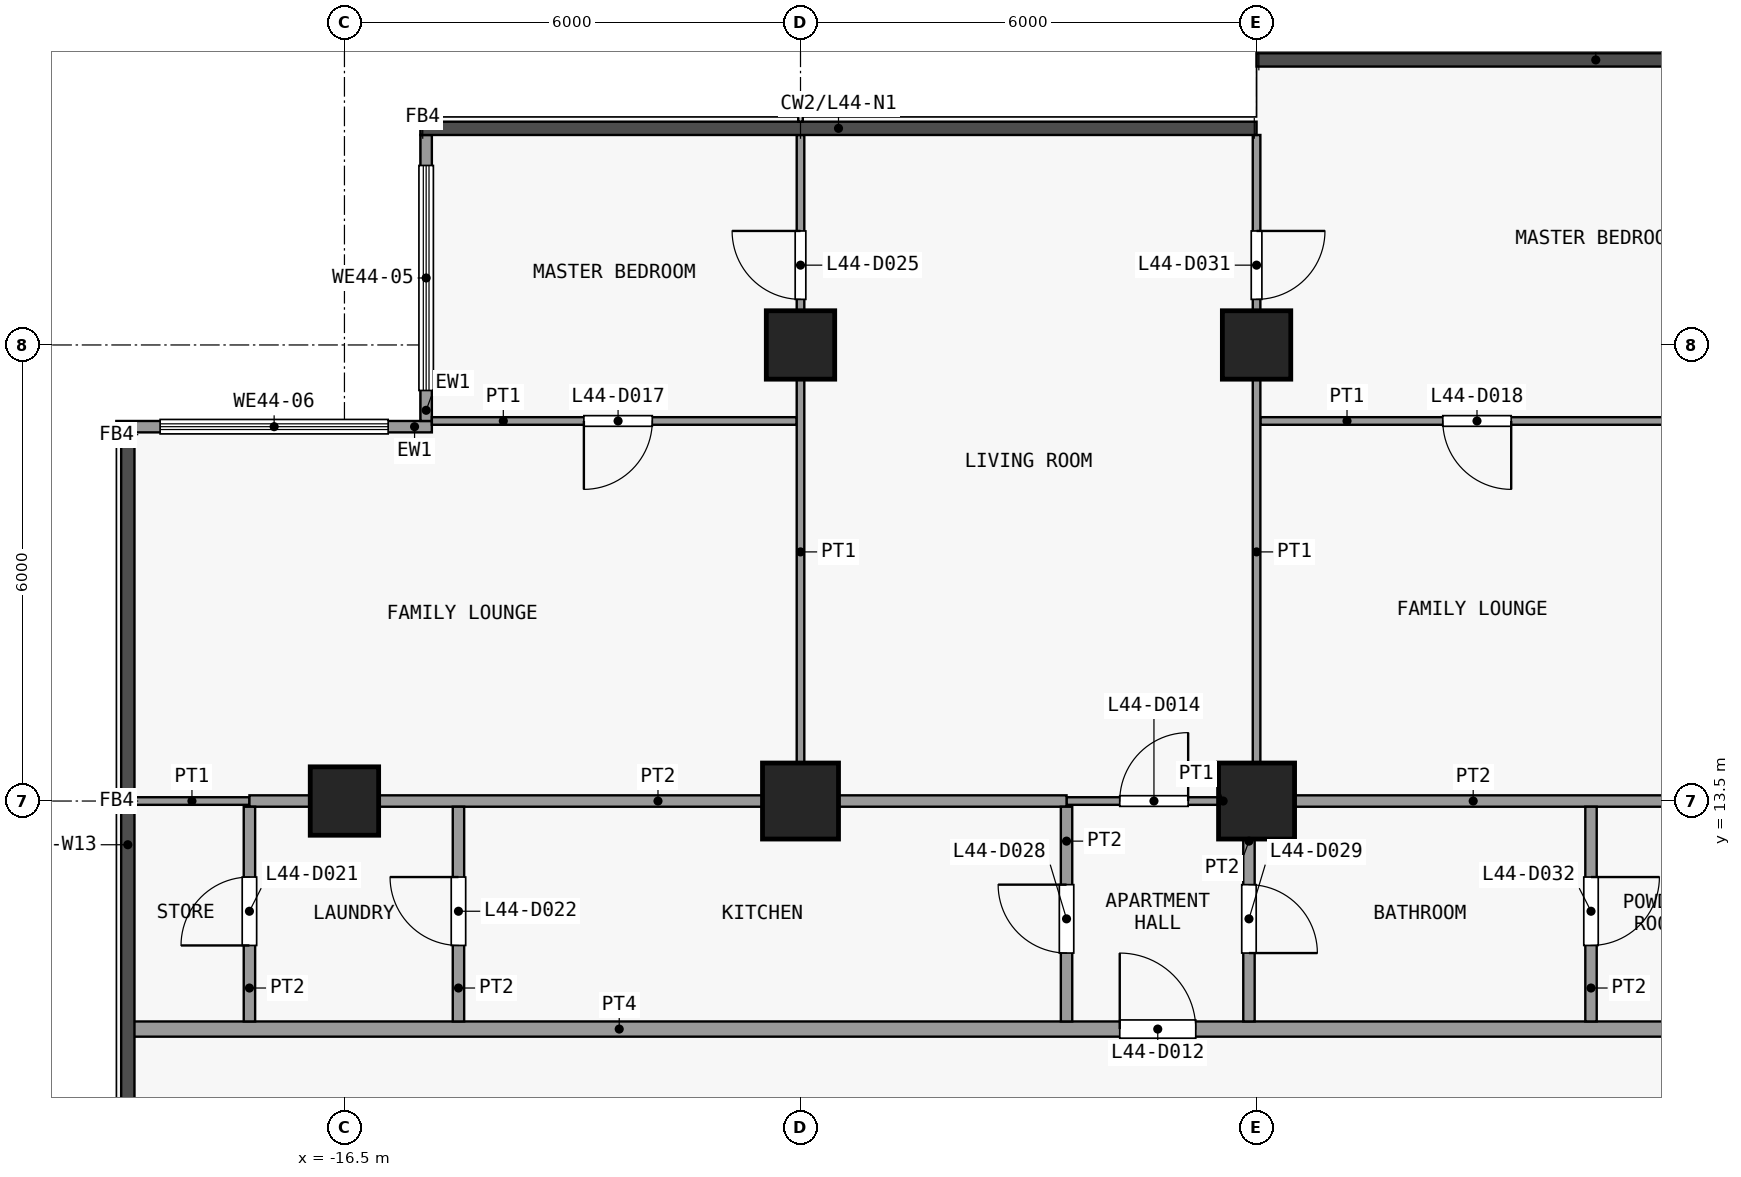
"""IFC4 building model, lengths in metres.
Left out: names, types, materials, properties, quantities, classifications, styles, units other than length and angle.
Written with IfcOpenShell. Run it as: python <this file> out.ifc"""

import sys

from ifc_helpers import new_model, si_unit, direction, frame, frame_2d, origin, origin_2d, place, context, subcontext, project, spatial, rectangle, extrude, element, fill, save


model = new_model("IFC4")
c1 = context("Model", 3, precision=1e-05, world=origin(), true_north=direction((0.0, 1.0)))
c2 = subcontext(c1, "Body", "Model", "MODEL_VIEW")
j1 = project(units=[si_unit("LENGTHUNIT", "METRE"), si_unit("PLANEANGLEUNIT", "RADIAN")], contexts=[c1])
p1 = place(None, origin())
s1 = spatial("IfcSite", under=j1, at=p1, CompositionType="ELEMENT")
p2 = place(p1, origin())
s2 = spatial("IfcBuilding", under=s1, at=p2, CompositionType="ELEMENT")
p3 = place(p2, frame((0.0, 0.0, 178.1)))
s3 = spatial("IfcBuildingStorey", under=s2, at=p3, CompositionType="ELEMENT", Elevation=178.1)
p4 = place(p3, frame((-16.5, 13.5, 0.0), z_axis=(0.0, 0.0, 1.0), x_axis=(1.0, 0.0, 0.0)))
e1 = element("IfcColumn", 1, at=p4, inside=s3, PredefinedType="COLUMN", context=c2, shape_type="SweptSolid", body=[
    extrude(rectangle(XDim=0.9, YDim=0.9, at=origin_2d()), origin(), (0.0, 0.0, 1.0), 3.6),
])
p5 = place(p3, frame((-10.5, 13.5, 0.0), z_axis=(0.0, 0.0, 1.0), x_axis=(1.0, 0.0, 0.0)))
e2 = element("IfcColumn", 2, at=p5, inside=s3, PredefinedType="COLUMN", context=c2, shape_type="SweptSolid", body=[
    extrude(rectangle(XDim=1.0, YDim=1.0, at=origin_2d()), origin(), (0.0, 0.0, 1.0), 3.6),
])
p6 = place(p3, frame((-10.5, 19.5, 0.0), z_axis=(0.0, 0.0, 1.0), x_axis=(1.0, 0.0, 0.0)))
e3 = element("IfcColumn", 3, at=p6, inside=s3, PredefinedType="COLUMN", context=c2, shape_type="SweptSolid", body=[
    extrude(rectangle(XDim=0.9, YDim=0.9, at=origin_2d()), origin(), (0.0, 0.0, 1.0), 3.6),
])
p7 = place(p3, frame((-4.5, 13.5, 0.0), z_axis=(0.0, 0.0, 1.0), x_axis=(1.0, 0.0, 0.0)))
e4 = element("IfcColumn", 4, at=p7, inside=s3, PredefinedType="COLUMN", context=c2, shape_type="SweptSolid", body=[
    extrude(rectangle(XDim=1.0, YDim=1.0, at=origin_2d()), origin(), (0.0, 0.0, 1.0), 3.6),
])
p8 = place(p3, frame((-4.5, 19.5, 0.0), z_axis=(0.0, 0.0, 1.0), x_axis=(1.0, 0.0, 0.0)))
e5 = element("IfcColumn", 5, at=p8, inside=s3, PredefinedType="COLUMN", context=c2, shape_type="SweptSolid", body=[
    extrude(rectangle(XDim=0.9, YDim=0.9, at=origin_2d()), origin(), (0.0, 0.0, 1.0), 3.6),
])
p9 = place(p3, frame((-15.425, 18.5, 0.0), z_axis=(0.0, 0.0, 1.0), x_axis=(0.0, 1.0, 0.0)))
e6 = element("IfcWall", 6, at=p9, inside=s3, PredefinedType="SOLIDWALL", context=c2, shape_type="SweptSolid", body=[
    extrude(rectangle(XDim=3.762, YDim=0.15, at=frame_2d((1.881, 0.0))), origin(), (0.0, 0.0, 1.0), 3.3),
])
p10 = place(p9, frame((0.401, 0.0, 0.9)))
e7 = element("IfcOpeningElement", 7, at=p10, cuts=e6, PredefinedType="OPENING", context=c2, shape_type="SweptSolid", body=[
    extrude(rectangle(XDim=2.96, YDim=2.4, at=frame_2d((1.48, 1.2))), frame((0.0, 0.085, 0.0), z_axis=(0.0, -1.0, 0.0), x_axis=(1.0, 0.0, 0.0)), (0.0, 0.0, 1.0), 0.17),
])
p11 = place(p3, frame((-19.5, 18.425, 0.0), z_axis=(0.0, 0.0, 1.0), x_axis=(1.0, 0.0, 0.0)))
e8 = element("IfcWall", 8, at=p11, inside=s3, PredefinedType="SOLIDWALL", context=c2, shape_type="SweptSolid", body=[
    extrude(rectangle(XDim=4.15, YDim=0.15, at=frame_2d((2.075, 0.0))), origin(), (0.0, 0.0, 1.0), 3.3),
])
p12 = place(p11, frame((0.575, 0.0, 0.9)))
e9 = element("IfcOpeningElement", 9, at=p12, cuts=e8, PredefinedType="OPENING", context=c2, shape_type="SweptSolid", body=[
    extrude(rectangle(XDim=3.0, YDim=2.4, at=frame_2d((1.5, 1.2))), frame((0.0, 0.085, 0.0), z_axis=(0.0, -1.0, 0.0), x_axis=(1.0, 0.0, 0.0)), (0.0, 0.0, 1.0), 0.17),
])
p13 = place(p3, frame((-19.35, 10.5, 0.0), z_axis=(0.0, 0.0, 1.0), x_axis=(1.0, 0.0, 0.0)))
e10 = element("IfcWall", 10, at=p13, inside=s3, PredefinedType="PARTITIONING", context=c2, shape_type="SweptSolid", body=[
    extrude(rectangle(XDim=37.2, YDim=0.2, at=frame_2d((18.6, 0.0))), origin(), (0.0, 0.0, 1.0), 3.3),
])
p14 = place(p13, frame((13.05, 0.0, 0.0)))
e11 = element("IfcOpeningElement", 11, at=p14, cuts=e10, PredefinedType="OPENING", context=c2, shape_type="SweptSolid", body=[
    extrude(rectangle(XDim=1.0, YDim=2.1, at=frame_2d((0.5, 1.05))), frame((0.0, 0.11, 0.0), z_axis=(0.0, -1.0, 0.0), x_axis=(1.0, 0.0, 0.0)), (0.0, 0.0, 1.0), 0.22),
])
p15 = place(p13, frame((27.05, 0.0, 0.0)))
e12 = element("IfcOpeningElement", 12, at=p15, cuts=e10, PredefinedType="OPENING", context=c2, shape_type="SweptSolid", body=[
    extrude(rectangle(XDim=1.0, YDim=2.1, at=frame_2d((0.5, 1.05))), frame((0.0, 0.11, 0.0), z_axis=(0.0, -1.0, 0.0), x_axis=(1.0, 0.0, 0.0)), (0.0, 0.0, 1.0), 0.22),
])
p16 = place(p3, frame((-19.262, 13.5, 0.0), z_axis=(0.0, 0.0, 1.0), x_axis=(1.0, 0.0, 0.0)))
e13 = element("IfcWall", 13, at=p16, inside=s3, PredefinedType="PARTITIONING", context=c2, shape_type="SweptSolid", body=[
    extrude(rectangle(XDim=1.512, YDim=0.1, at=frame_2d((0.756, 0.0))), origin(), (0.0, 0.0, 1.0), 3.3),
])
p17 = place(p3, frame((-7.0, 13.5, 0.0), z_axis=(0.0, 0.0, 1.0), x_axis=(1.0, 0.0, 0.0)))
e14 = element("IfcWall", 14, at=p17, inside=s3, PredefinedType="PARTITIONING", context=c2, shape_type="SweptSolid", body=[
    extrude(rectangle(XDim=2.4, YDim=0.1, at=frame_2d((1.2, 0.0))), origin(), (0.0, 0.0, 1.0), 3.3),
])
p18 = place(p17, frame((0.7, 0.0, 0.0)))
e15 = element("IfcOpeningElement", 15, at=p18, cuts=e14, PredefinedType="OPENING", context=c2, shape_type="SweptSolid", body=[
    extrude(rectangle(XDim=0.9, YDim=2.1, at=frame_2d((0.45, 1.05))), frame((0.0, 0.06, 0.0), z_axis=(0.0, -1.0, 0.0), x_axis=(1.0, 0.0, 0.0)), (0.0, 0.0, 1.0), 0.12),
])
p19 = place(p3, frame((-17.75, 13.5, 0.0), z_axis=(0.0, 0.0, 1.0), x_axis=(1.0, 0.0, 0.0)))
e16 = element("IfcWall", 16, at=p19, inside=s3, PredefinedType="PARTITIONING", context=c2, shape_type="SweptSolid", body=[
    extrude(rectangle(XDim=10.75, YDim=0.15, at=frame_2d((5.375, 0.0))), origin(), (0.0, 0.0, 1.0), 3.3),
])
p20 = place(p3, frame((-4.5, 13.5, 0.0), z_axis=(0.0, 0.0, 1.0), x_axis=(1.0, 0.0, 0.0)))
e17 = element("IfcWall", 17, at=p20, inside=s3, PredefinedType="PARTITIONING", context=c2, shape_type="SweptSolid", body=[
    extrude(rectangle(XDim=5.7, YDim=0.15, at=frame_2d((2.85, 0.0))), origin(), (0.0, 0.0, 1.0), 3.3),
])
p21 = place(p3, frame((-15.35, 18.5, 0.0), z_axis=(0.0, 0.0, 1.0), x_axis=(1.0, 0.0, 0.0)))
e18 = element("IfcWall", 18, at=p21, inside=s3, PredefinedType="PARTITIONING", context=c2, shape_type="SweptSolid", body=[
    extrude(rectangle(XDim=4.8, YDim=0.1, at=frame_2d((2.4, 0.0))), origin(), (0.0, 0.0, 1.0), 3.3),
])
p22 = place(p21, frame((2.0, 0.0, 0.0)))
e19 = element("IfcOpeningElement", 19, at=p22, cuts=e18, PredefinedType="OPENING", context=c2, shape_type="SweptSolid", body=[
    extrude(rectangle(XDim=0.9, YDim=2.1, at=frame_2d((0.45, 1.05))), frame((0.0, 0.06, 0.0), z_axis=(0.0, -1.0, 0.0), x_axis=(1.0, 0.0, 0.0)), (0.0, 0.0, 1.0), 0.12),
])
p23 = place(p3, frame((-4.45, 18.5, 0.0), z_axis=(0.0, 0.0, 1.0), x_axis=(1.0, 0.0, 0.0)))
e20 = element("IfcWall", 20, at=p23, inside=s3, PredefinedType="PARTITIONING", context=c2, shape_type="SweptSolid", body=[
    extrude(rectangle(XDim=5.65, YDim=0.1, at=frame_2d((2.825, 0.0))), origin(), (0.0, 0.0, 1.0), 3.3),
])
p24 = place(p23, frame((2.4, 0.0, 0.0)))
e21 = element("IfcOpeningElement", 21, at=p24, cuts=e20, PredefinedType="OPENING", context=c2, shape_type="SweptSolid", body=[
    extrude(rectangle(XDim=0.9, YDim=2.1, at=frame_2d((0.45, 1.05))), frame((0.0, 0.06, 0.0), z_axis=(0.0, -1.0, 0.0), x_axis=(1.0, 0.0, 0.0)), (0.0, 0.0, 1.0), 0.12),
])
p25 = place(p3, frame((-17.75, 10.6, 0.0), z_axis=(0.0, 0.0, 1.0), x_axis=(0.0, 1.0, 0.0)))
e22 = element("IfcWall", 22, at=p25, inside=s3, PredefinedType="PARTITIONING", context=c2, shape_type="SweptSolid", body=[
    extrude(rectangle(XDim=2.825, YDim=0.15, at=frame_2d((1.413, 0.0))), origin(), (0.0, 0.0, 1.0), 3.3),
])
p26 = place(p25, frame((1.0, 0.0, 0.0)))
e23 = element("IfcOpeningElement", 23, at=p26, cuts=e22, PredefinedType="OPENING", context=c2, shape_type="SweptSolid", body=[
    extrude(rectangle(XDim=0.9, YDim=2.1, at=frame_2d((0.45, 1.05))), frame((0.0, 0.085, 0.0), z_axis=(0.0, -1.0, 0.0), x_axis=(1.0, 0.0, 0.0)), (0.0, 0.0, 1.0), 0.17),
])
p27 = place(p3, frame((-15.0, 10.6, 0.0), z_axis=(0.0, 0.0, 1.0), x_axis=(0.0, 1.0, 0.0)))
e24 = element("IfcWall", 24, at=p27, inside=s3, PredefinedType="PARTITIONING", context=c2, shape_type="SweptSolid", body=[
    extrude(rectangle(XDim=2.825, YDim=0.15, at=frame_2d((1.413, 0.0))), origin(), (0.0, 0.0, 1.0), 3.3),
])
p28 = place(p27, frame((1.0, 0.0, 0.0)))
e25 = element("IfcOpeningElement", 25, at=p28, cuts=e24, PredefinedType="OPENING", context=c2, shape_type="SweptSolid", body=[
    extrude(rectangle(XDim=0.9, YDim=2.1, at=frame_2d((0.45, 1.05))), frame((0.0, 0.085, 0.0), z_axis=(0.0, -1.0, 0.0), x_axis=(1.0, 0.0, 0.0)), (0.0, 0.0, 1.0), 0.17),
])
p29 = place(p3, frame((-10.5, 13.575, 0.0), z_axis=(0.0, 0.0, 1.0), x_axis=(0.0, 1.0, 0.0)))
e26 = element("IfcWall", 26, at=p29, inside=s3, PredefinedType="PARTITIONING", context=c2, shape_type="SweptSolid", body=[
    extrude(rectangle(XDim=8.688, YDim=0.1, at=frame_2d((4.344, 0.0))), origin(), (0.0, 0.0, 1.0), 3.3),
])
p30 = place(p29, frame((6.525, 0.0, 0.0)))
e27 = element("IfcOpeningElement", 27, at=p30, cuts=e26, PredefinedType="OPENING", context=c2, shape_type="SweptSolid", body=[
    extrude(rectangle(XDim=0.9, YDim=2.1, at=frame_2d((0.45, 1.05))), frame((0.0, 0.06, 0.0), z_axis=(0.0, -1.0, 0.0), x_axis=(1.0, 0.0, 0.0)), (0.0, 0.0, 1.0), 0.12),
])
p31 = place(p3, frame((-7.0, 10.6, 0.0), z_axis=(0.0, 0.0, 1.0), x_axis=(0.0, 1.0, 0.0)))
e28 = element("IfcWall", 28, at=p31, inside=s3, PredefinedType="PARTITIONING", context=c2, shape_type="SweptSolid", body=[
    extrude(rectangle(XDim=2.825, YDim=0.15, at=frame_2d((1.413, 0.0))), origin(), (0.0, 0.0, 1.0), 3.3),
])
p32 = place(p31, frame((0.9, 0.0, 0.0)))
e29 = element("IfcOpeningElement", 29, at=p32, cuts=e28, PredefinedType="OPENING", context=c2, shape_type="SweptSolid", body=[
    extrude(rectangle(XDim=0.9, YDim=2.1, at=frame_2d((0.45, 1.05))), frame((0.0, 0.085, 0.0), z_axis=(0.0, -1.0, 0.0), x_axis=(1.0, 0.0, 0.0)), (0.0, 0.0, 1.0), 0.17),
])
p33 = place(p3, frame((-4.6, 10.6, 0.0), z_axis=(0.0, 0.0, 1.0), x_axis=(0.0, 1.0, 0.0)))
e30 = element("IfcWall", 30, at=p33, inside=s3, PredefinedType="PARTITIONING", context=c2, shape_type="SweptSolid", body=[
    extrude(rectangle(XDim=2.825, YDim=0.15, at=frame_2d((1.413, 0.0))), origin(), (0.0, 0.0, 1.0), 3.3),
])
p34 = place(p33, frame((0.9, 0.0, 0.0)))
e31 = element("IfcOpeningElement", 31, at=p34, cuts=e30, PredefinedType="OPENING", context=c2, shape_type="SweptSolid", body=[
    extrude(rectangle(XDim=0.9, YDim=2.1, at=frame_2d((0.45, 1.05))), frame((0.0, 0.085, 0.0), z_axis=(0.0, -1.0, 0.0), x_axis=(1.0, 0.0, 0.0)), (0.0, 0.0, 1.0), 0.17),
])
p35 = place(p3, frame((-4.5, 13.575, 0.0), z_axis=(0.0, 0.0, 1.0), x_axis=(0.0, 1.0, 0.0)))
e32 = element("IfcWall", 32, at=p35, inside=s3, PredefinedType="PARTITIONING", context=c2, shape_type="SweptSolid", body=[
    extrude(rectangle(XDim=8.688, YDim=0.1, at=frame_2d((4.344, 0.0))), origin(), (0.0, 0.0, 1.0), 3.3),
])
p36 = place(p35, frame((6.525, 0.0, 0.0)))
e33 = element("IfcOpeningElement", 33, at=p36, cuts=e32, PredefinedType="OPENING", context=c2, shape_type="SweptSolid", body=[
    extrude(rectangle(XDim=0.9, YDim=2.1, at=frame_2d((0.45, 1.05))), frame((0.0, 0.06, 0.0), z_axis=(0.0, -1.0, 0.0), x_axis=(1.0, 0.0, 0.0)), (0.0, 0.0, 1.0), 0.12),
])
p37 = place(p3, frame((-0.1, 10.6, 0.0), z_axis=(0.0, 0.0, 1.0), x_axis=(0.0, 1.0, 0.0)))
e34 = element("IfcWall", 34, at=p37, inside=s3, PredefinedType="PARTITIONING", context=c2, shape_type="SweptSolid", body=[
    extrude(rectangle(XDim=2.825, YDim=0.15, at=frame_2d((1.413, 0.0))), origin(), (0.0, 0.0, 1.0), 3.3),
])
p38 = place(p37, frame((1.0, 0.0, 0.0)))
e35 = element("IfcOpeningElement", 35, at=p38, cuts=e34, PredefinedType="OPENING", context=c2, shape_type="SweptSolid", body=[
    extrude(rectangle(XDim=0.9, YDim=2.1, at=frame_2d((0.45, 1.05))), frame((0.0, 0.085, 0.0), z_axis=(0.0, -1.0, 0.0), x_axis=(1.0, 0.0, 0.0)), (0.0, 0.0, 1.0), 0.17),
])
p39 = place(p10, origin())
e36 = element("IfcWindow", 36, at=p39, inside=s3, PartitioningType="SINGLE_PANEL", PredefinedType="WINDOW", context=c2, shape_type="SweptSolid", body=[
    extrude(rectangle(XDim=2.96, YDim=2.4, at=frame_2d((1.48, 1.2))), frame((0.0, 0.03, 0.0), z_axis=(0.0, -1.0, 0.0), x_axis=(1.0, 0.0, 0.0)), (0.0, 0.0, 1.0), 0.06),
])
fill(e7, e36)
p40 = place(p12, origin())
e37 = element("IfcWindow", 37, at=p40, inside=s3, PartitioningType="SINGLE_PANEL", PredefinedType="WINDOW", context=c2, shape_type="SweptSolid", body=[
    extrude(rectangle(XDim=3.0, YDim=2.4, at=frame_2d((1.5, 1.2))), frame((0.0, 0.03, 0.0), z_axis=(0.0, -1.0, 0.0), x_axis=(1.0, 0.0, 0.0)), (0.0, 0.0, 1.0), 0.06),
])
fill(e9, e37)
p41 = place(p14, origin())
e38 = element("IfcDoor", 38, at=p41, inside=s3, OperationType="SINGLE_SWING_RIGHT", PredefinedType="DOOR", context=c2, shape_type="SweptSolid", body=[
    extrude(rectangle(XDim=1.0, YDim=2.1, at=frame_2d((0.5, 1.05))), frame((0.0, 0.025, 0.0), z_axis=(0.0, -1.0, 0.0), x_axis=(1.0, 0.0, 0.0)), (0.0, 0.0, 1.0), 0.05),
])
fill(e11, e38)
p42 = place(p18, origin())
e39 = element("IfcDoor", 39, at=p42, inside=s3, OperationType="SINGLE_SWING_LEFT", PredefinedType="DOOR", context=c2, shape_type="SweptSolid", body=[
    extrude(rectangle(XDim=0.9, YDim=2.1, at=frame_2d((0.45, 1.05))), frame((0.0, 0.025, 0.0), z_axis=(0.0, -1.0, 0.0), x_axis=(1.0, 0.0, 0.0)), (0.0, 0.0, 1.0), 0.05),
])
fill(e15, e39)
p43 = place(p22, origin())
e40 = element("IfcDoor", 40, at=p43, inside=s3, OperationType="SINGLE_SWING_LEFT", PredefinedType="DOOR", context=c2, shape_type="SweptSolid", body=[
    extrude(rectangle(XDim=0.9, YDim=2.1, at=frame_2d((0.45, 1.05))), frame((0.0, 0.025, 0.0), z_axis=(0.0, -1.0, 0.0), x_axis=(1.0, 0.0, 0.0)), (0.0, 0.0, 1.0), 0.05),
])
fill(e19, e40)
p44 = place(p24, origin())
e41 = element("IfcDoor", 41, at=p44, inside=s3, OperationType="SINGLE_SWING_RIGHT", PredefinedType="DOOR", context=c2, shape_type="SweptSolid", body=[
    extrude(rectangle(XDim=0.9, YDim=2.1, at=frame_2d((0.45, 1.05))), frame((0.0, 0.025, 0.0), z_axis=(0.0, -1.0, 0.0), x_axis=(1.0, 0.0, 0.0)), (0.0, 0.0, 1.0), 0.05),
])
fill(e21, e41)
p45 = place(p26, origin())
e42 = element("IfcDoor", 42, at=p45, inside=s3, OperationType="SINGLE_SWING_RIGHT", PredefinedType="DOOR", context=c2, shape_type="SweptSolid", body=[
    extrude(rectangle(XDim=0.9, YDim=2.1, at=frame_2d((0.45, 1.05))), frame((0.0, 0.025, 0.0), z_axis=(0.0, -1.0, 0.0), x_axis=(1.0, 0.0, 0.0)), (0.0, 0.0, 1.0), 0.05),
])
fill(e23, e42)
p46 = place(p28, origin())
e43 = element("IfcDoor", 43, at=p46, inside=s3, OperationType="SINGLE_SWING_LEFT", PredefinedType="DOOR", context=c2, shape_type="SweptSolid", body=[
    extrude(rectangle(XDim=0.9, YDim=2.1, at=frame_2d((0.45, 1.05))), frame((0.0, 0.025, 0.0), z_axis=(0.0, -1.0, 0.0), x_axis=(1.0, 0.0, 0.0)), (0.0, 0.0, 1.0), 0.05),
])
fill(e25, e43)
p47 = place(p30, origin())
e44 = element("IfcDoor", 44, at=p47, inside=s3, OperationType="SINGLE_SWING_LEFT", PredefinedType="DOOR", context=c2, shape_type="SweptSolid", body=[
    extrude(rectangle(XDim=0.9, YDim=2.1, at=frame_2d((0.45, 1.05))), frame((0.0, 0.025, 0.0), z_axis=(0.0, -1.0, 0.0), x_axis=(1.0, 0.0, 0.0)), (0.0, 0.0, 1.0), 0.05),
])
fill(e27, e44)
p48 = place(p32, origin())
e45 = element("IfcDoor", 45, at=p48, inside=s3, OperationType="SINGLE_SWING_LEFT", PredefinedType="DOOR", context=c2, shape_type="SweptSolid", body=[
    extrude(rectangle(XDim=0.9, YDim=2.1, at=frame_2d((0.45, 1.05))), frame((0.0, 0.025, 0.0), z_axis=(0.0, -1.0, 0.0), x_axis=(1.0, 0.0, 0.0)), (0.0, 0.0, 1.0), 0.05),
])
fill(e29, e45)
p49 = place(p34, origin())
e46 = element("IfcDoor", 46, at=p49, inside=s3, OperationType="SINGLE_SWING_LEFT", PredefinedType="DOOR", context=c2, shape_type="SweptSolid", body=[
    extrude(rectangle(XDim=0.9, YDim=2.1, at=frame_2d((0.45, 1.05))), frame((0.0, 0.025, 0.0), z_axis=(0.0, -1.0, 0.0), x_axis=(1.0, 0.0, 0.0)), (0.0, 0.0, 1.0), 0.05),
])
fill(e31, e46)
p50 = place(p36, origin())
e47 = element("IfcDoor", 47, at=p50, inside=s3, OperationType="SINGLE_SWING_RIGHT", PredefinedType="DOOR", context=c2, shape_type="SweptSolid", body=[
    extrude(rectangle(XDim=0.9, YDim=2.1, at=frame_2d((0.45, 1.05))), frame((0.0, 0.025, 0.0), z_axis=(0.0, -1.0, 0.0), x_axis=(1.0, 0.0, 0.0)), (0.0, 0.0, 1.0), 0.05),
])
fill(e33, e47)
p51 = place(p38, origin())
e48 = element("IfcDoor", 48, at=p51, inside=s3, OperationType="SINGLE_SWING_RIGHT", PredefinedType="DOOR", context=c2, shape_type="SweptSolid", body=[
    extrude(rectangle(XDim=0.9, YDim=2.1, at=frame_2d((0.45, 1.05))), frame((0.0, 0.025, 0.0), z_axis=(0.0, -1.0, 0.0), x_axis=(1.0, 0.0, 0.0)), (0.0, 0.0, 1.0), 0.05),
])
fill(e35, e48)
save(model, sys.argv[1])
